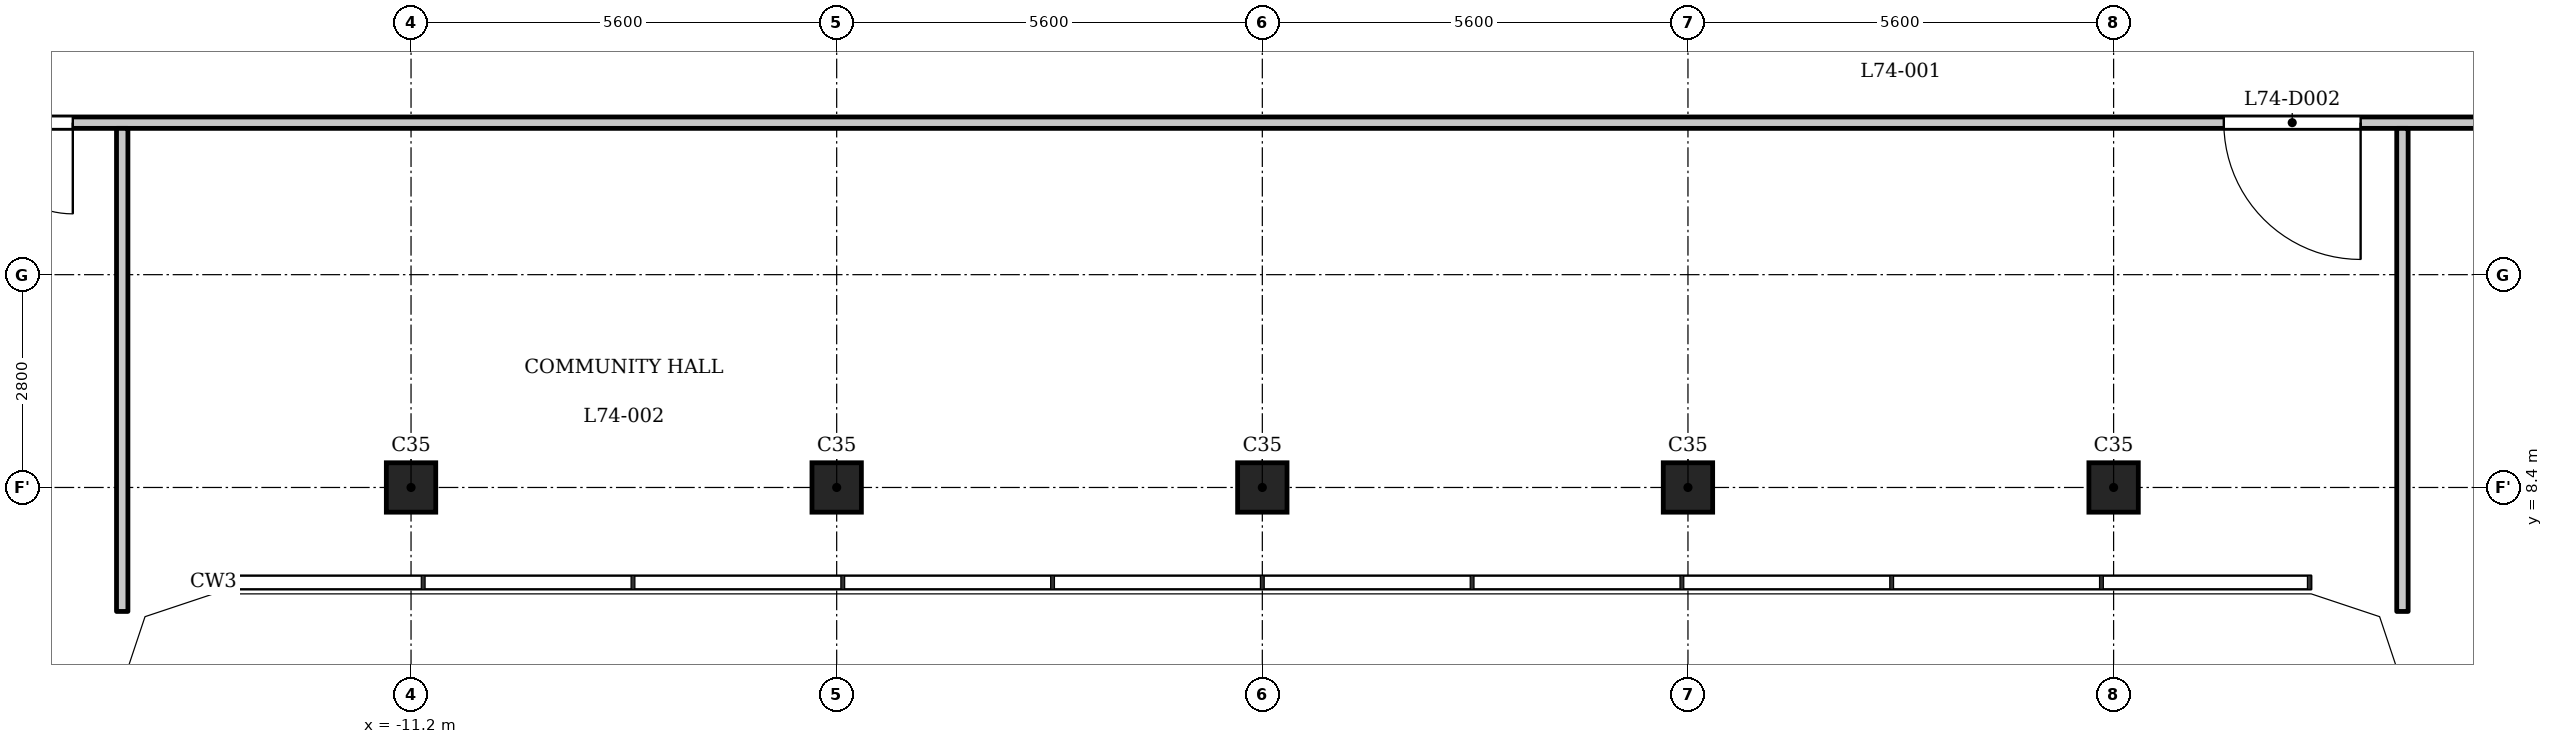
"""IFC4 building model, lengths in metres.
Left out: names, types, materials, properties, quantities, classifications, styles, units other than length and angle.
Written with IfcOpenShell. Run it as: python <this file> out.ifc"""

import sys

from ifc_helpers import new_model, si_unit, direction, frame, frame_2d, origin, origin_2d, place, context, subcontext, project, spatial, polyline, rectangle, outline, extrude, element, fill, save


model = new_model("IFC4")
c1 = context("Model", 3, precision=1e-05, world=origin(), true_north=direction((0.0, 1.0)))
c2 = subcontext(c1, "Body", "Model", "MODEL_VIEW")
j1 = project(units=[si_unit("LENGTHUNIT", "METRE"), si_unit("PLANEANGLEUNIT", "RADIAN")], contexts=[c1])
p1 = place(None, origin())
s1 = spatial("IfcSite", under=j1, at=p1, CompositionType="ELEMENT")
p2 = place(p1, origin())
s2 = spatial("IfcBuilding", under=s1, at=p2, CompositionType="ELEMENT")
p3 = place(p2, frame((0.0, 0.0, 283.7)))
s3 = spatial("IfcBuildingStorey", under=s2, at=p3, CompositionType="ELEMENT", Elevation=283.7)
for number, where, z_axis, x_axis in (
    (1, (-11.2, 8.4, 0.0), (0.0, 0.0, 1.0), (1.0, 0.0, 0.0)),
    (2, (-5.6, 8.4, 0.0), (0.0, 0.0, 1.0), (1.0, 0.0, 0.0)),
    (3, (0.0, 8.4, 0.0), (0.0, 0.0, 1.0), (1.0, 0.0, 0.0)),
    (4, (5.6, 8.4, 0.0), (0.0, 0.0, 1.0), (1.0, 0.0, 0.0)),
    (5, (11.2, 8.4, 0.0), (0.0, 0.0, 1.0), (1.0, 0.0, 0.0)),
):
    element("IfcColumn", number, at=place(p3, frame(where, z_axis=z_axis, x_axis=x_axis)), inside=s3, PredefinedType="COLUMN", context=c2, shape_type="SweptSolid", body=[
        extrude(rectangle(XDim=0.65, YDim=0.65, at=origin_2d()), origin(), (0.0, 0.0, 1.0), 5.4),
    ])
p4 = place(p3, frame((-17.4, 13.2, 0.0), z_axis=(0.0, 0.0, 1.0), x_axis=(1.0, 0.0, 0.0)))
e6 = element("IfcWall", 6, at=p4, inside=s3, PredefinedType="PARTITIONING", context=c2, shape_type="SweptSolid", body=[
    extrude(rectangle(XDim=34.8, YDim=0.15, at=frame_2d((17.4, 0.0))), origin(), (0.0, 0.0, 1.0), 4.95),
])
p5 = place(p4, frame((0.55, 0.0, 0.0)))
e7 = element("IfcOpeningElement", 7, at=p5, cuts=e6, PredefinedType="OPENING", context=c2, shape_type="SweptSolid", body=[
    extrude(rectangle(XDim=1.2, YDim=2.1, at=frame_2d((0.6, 1.05))), frame((0.0, 0.085, 0.0), z_axis=(0.0, -1.0, 0.0), x_axis=(1.0, 0.0, 0.0)), (0.0, 0.0, 1.0), 0.17),
])
p6 = place(p4, frame((30.05, 0.0, 0.0)))
e8 = element("IfcOpeningElement", 8, at=p6, cuts=e6, PredefinedType="OPENING", context=c2, shape_type="SweptSolid", body=[
    extrude(rectangle(XDim=1.8, YDim=2.1, at=frame_2d((0.9, 1.05))), frame((0.0, 0.085, 0.0), z_axis=(0.0, -1.0, 0.0), x_axis=(1.0, 0.0, 0.0)), (0.0, 0.0, 1.0), 0.17),
])
for number, where, z_axis, x_axis in (
    (9, (-15.0, 6.769, 0.0), (0.0, 0.0, 1.0), (0.0, 1.0, 0.0)),
    (10, (15.0, 6.769, 0.0), (0.0, 0.0, 1.0), (0.0, 1.0, 0.0)),
):
    element("IfcWall", number, at=place(p3, frame(where, z_axis=z_axis, x_axis=x_axis)), inside=s3, PredefinedType="PARTITIONING", context=c2, shape_type="SweptSolid", body=[
        extrude(rectangle(XDim=6.356, YDim=0.15, at=frame_2d((3.178, 0.0))), origin(), (0.0, 0.0, 1.0), 4.95),
    ])
p7 = place(p3, origin())
e11 = element("IfcWall", 11, at=p7, inside=s3, PredefinedType="SOLIDWALL", context=c2, shape_type="SweptSolid", body=[
    extrude(outline(polyline([(-13.849, 7.3), (-14.937, 6.937), (-15.3, 5.849), (-15.3, 5.8), (-15.0, 5.8), (-14.7, 6.7), (-13.8, 7.0), (-13.8, 7.3), (-13.849, 7.3)])), origin(), (0.0, 0.0, 1.0), 4.95),
])
e12 = element("IfcWall", 12, at=p7, inside=s3, PredefinedType="SOLIDWALL", context=c2, shape_type="SweptSolid", body=[
    extrude(outline(polyline([(14.937, 6.937), (13.849, 7.3), (13.8, 7.3), (13.8, 7.0), (14.7, 6.7), (15.0, 5.8), (15.3, 5.8), (15.3, 5.849), (14.937, 6.937)])), origin(), (0.0, 0.0, 1.0), 4.95),
])
p8 = place(p5, origin())
e13 = element("IfcDoor", 13, at=p8, inside=s3, OperationType="SINGLE_SWING_RIGHT", PredefinedType="DOOR", context=c2, shape_type="SweptSolid", body=[
    extrude(rectangle(XDim=1.2, YDim=2.1, at=frame_2d((0.6, 1.05))), frame((0.0, 0.025, 0.0), z_axis=(0.0, -1.0, 0.0), x_axis=(1.0, 0.0, 0.0)), (0.0, 0.0, 1.0), 0.05),
])
fill(e7, e13)
p9 = place(p6, origin())
e14 = element("IfcDoor", 14, at=p9, inside=s3, OperationType="SINGLE_SWING_RIGHT", PredefinedType="DOOR", context=c2, shape_type="SweptSolid", body=[
    extrude(rectangle(XDim=1.8, YDim=2.1, at=frame_2d((0.9, 1.05))), frame((0.0, 0.025, 0.0), z_axis=(0.0, -1.0, 0.0), x_axis=(1.0, 0.0, 0.0)), (0.0, 0.0, 1.0), 0.05),
])
fill(e8, e14)
save(model, sys.argv[1])
